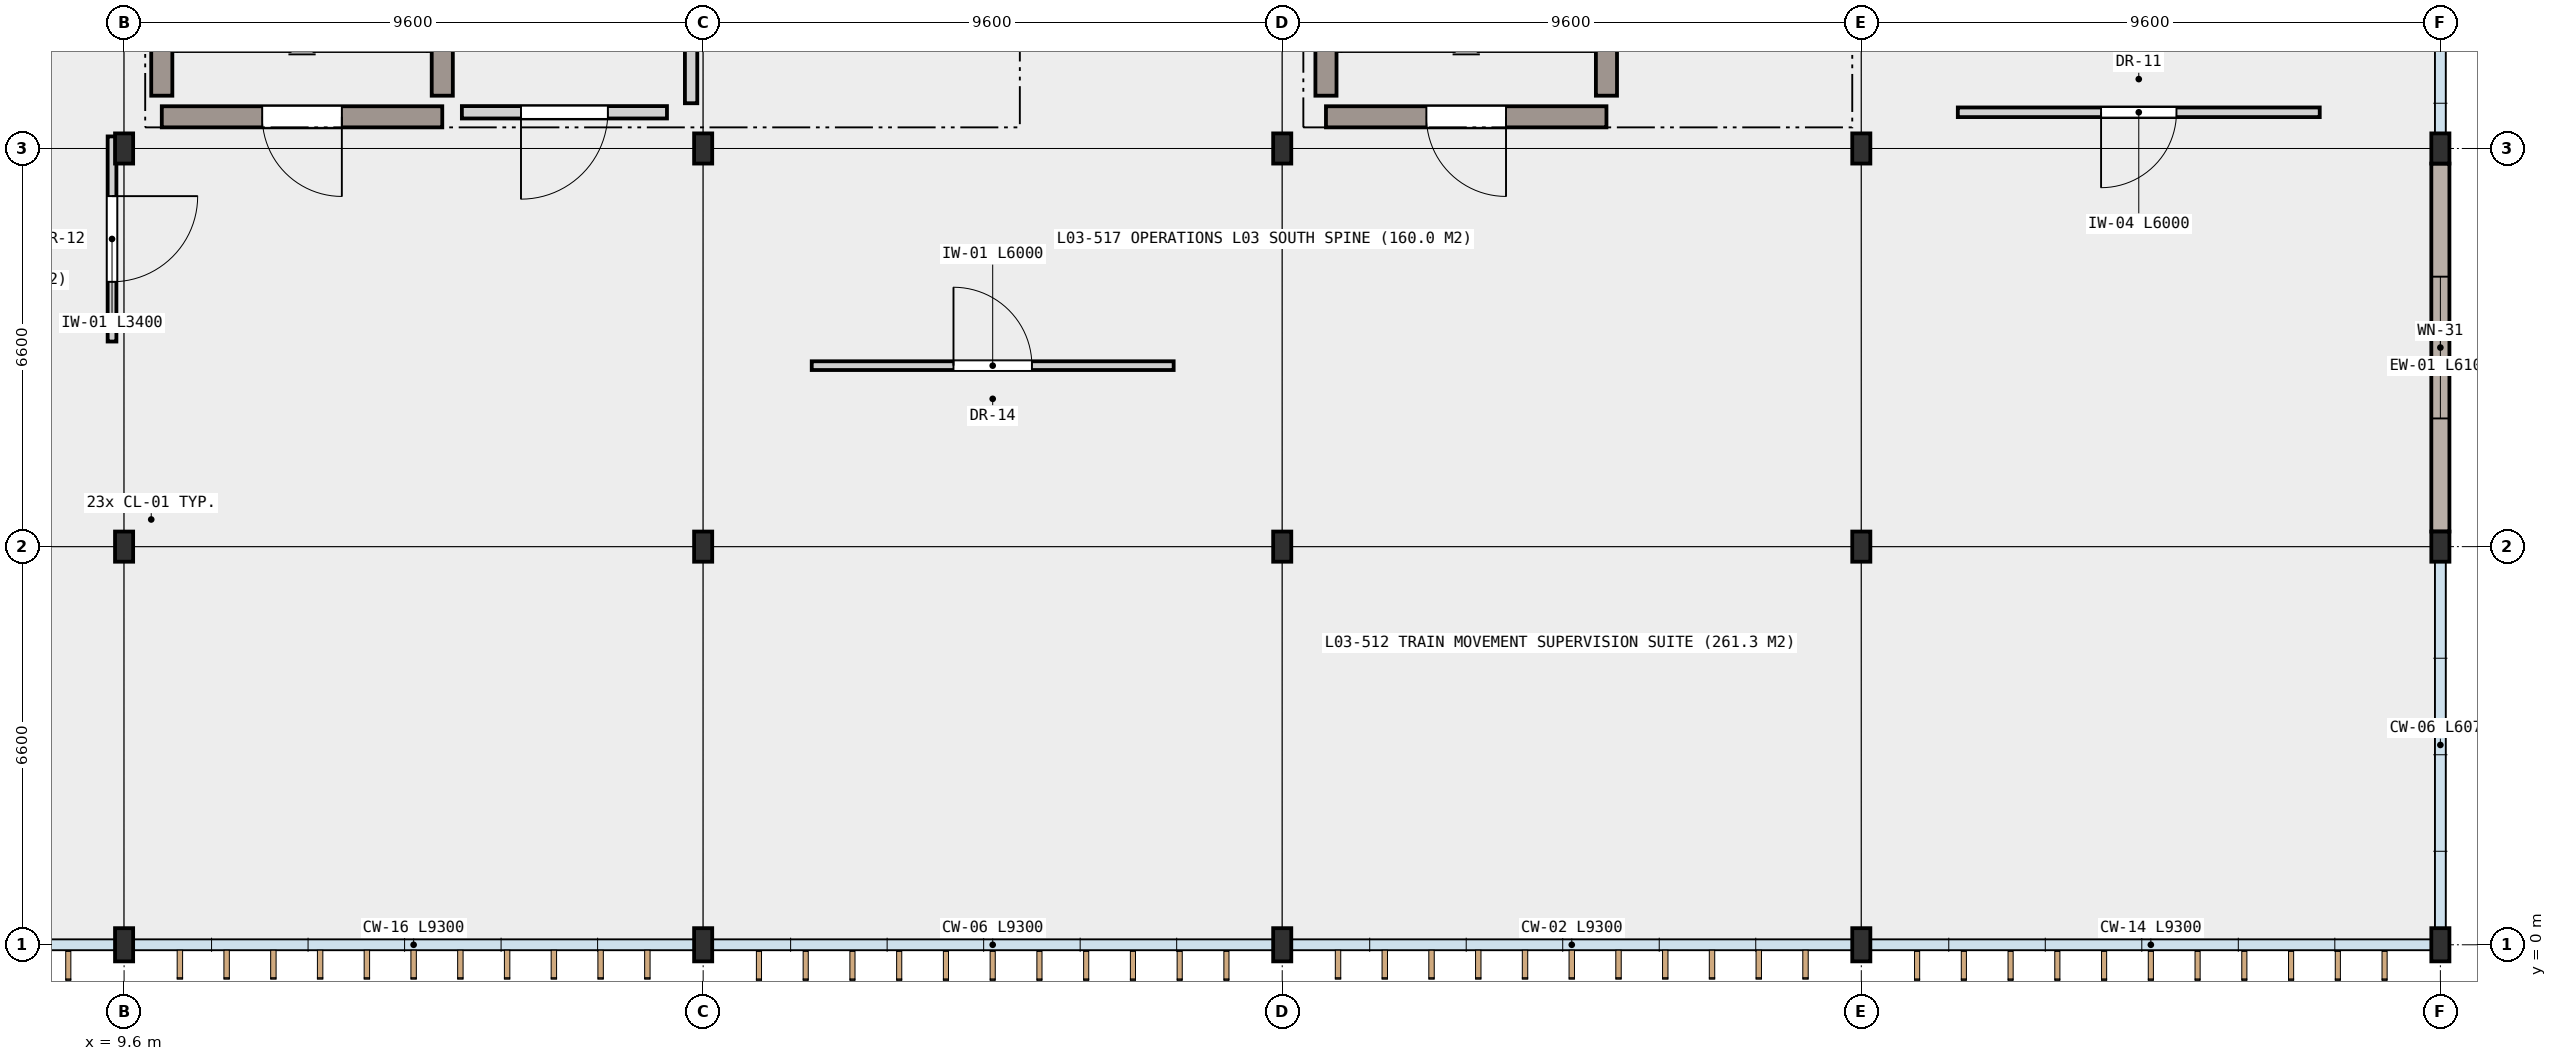
"""IFC4 building model, lengths in metres.
Left out: names, types, materials, properties, quantities, classifications, styles, units other than length and angle.
Written with IfcOpenShell. Run it as: python <this file> out.ifc"""

import sys

from ifc_helpers import new_model, si_unit, direction, frame, frame_2d, origin, origin_2d, place, context, subcontext, project, spatial, rectangle, i_section, extrude, element, fill, save


model = new_model("IFC4")
c1 = context("Model", 3, precision=1e-05, world=origin(), true_north=direction((0.0, 1.0)))
c2 = subcontext(c1, "Body", "Model", "MODEL_VIEW")
j1 = project(units=[si_unit("LENGTHUNIT", "METRE"), si_unit("PLANEANGLEUNIT", "RADIAN")], contexts=[c1])
p1 = place(None, origin())
s1 = spatial("IfcSite", under=j1, at=p1, CompositionType="ELEMENT")
p2 = place(p1, origin())
s2 = spatial("IfcBuilding", under=s1, at=p2, CompositionType="ELEMENT")
p3 = place(p2, frame((0.0, 0.0, 14.4)))
s3 = spatial("IfcBuildingStorey", under=s2, at=p3, CompositionType="ELEMENT", Elevation=14.4)
p4 = place(p3, frame((9.6, 0.0, 0.0), z_axis=(0.0, 0.0, 1.0), x_axis=(1.0, 0.0, 0.0)))
e1 = element("IfcColumn", 1, at=p4, inside=s3, PredefinedType="COLUMN", context=c2, shape_type="SweptSolid", body=[
    extrude(i_section(OverallWidth=0.3, OverallDepth=0.55, WebThickness=0.015, FlangeThickness=0.029, FilletRadius=0.027, at=origin_2d()), origin(), (0.0, 0.0, 1.0), 4.2),
])
for number, where, z_axis, x_axis in (
    (2, (9.6, 6.6, 0.0), (0.0, 0.0, 1.0), (1.0, 0.0, 0.0)),
    (3, (9.6, 13.2, 0.0), (0.0, 0.0, 1.0), (1.0, 0.0, 0.0)),
):
    element("IfcColumn", number, at=place(p3, frame(where, z_axis=z_axis, x_axis=x_axis)), inside=s3, PredefinedType="COLUMN", context=c2, shape_type="SweptSolid", body=[
        extrude(i_section(OverallWidth=0.3, OverallDepth=0.5, WebThickness=0.014, FlangeThickness=0.028, FilletRadius=0.027, at=origin_2d()), origin(), (0.0, 0.0, 1.0), 4.2),
    ])
p5 = place(p3, frame((19.2, 0.0, 0.0), z_axis=(0.0, 0.0, 1.0), x_axis=(1.0, 0.0, 0.0)))
e4 = element("IfcColumn", 4, at=p5, inside=s3, PredefinedType="COLUMN", context=c2, shape_type="SweptSolid", body=[
    extrude(i_section(OverallWidth=0.3, OverallDepth=0.55, WebThickness=0.015, FlangeThickness=0.029, FilletRadius=0.027, at=origin_2d()), origin(), (0.0, 0.0, 1.0), 4.2),
])
for number, where, z_axis, x_axis in (
    (5, (19.2, 6.6, 0.0), (0.0, 0.0, 1.0), (1.0, 0.0, 0.0)),
    (6, (19.2, 13.2, 0.0), (0.0, 0.0, 1.0), (1.0, 0.0, 0.0)),
):
    element("IfcColumn", number, at=place(p3, frame(where, z_axis=z_axis, x_axis=x_axis)), inside=s3, PredefinedType="COLUMN", context=c2, shape_type="SweptSolid", body=[
        extrude(i_section(OverallWidth=0.3, OverallDepth=0.5, WebThickness=0.014, FlangeThickness=0.028, FilletRadius=0.027, at=origin_2d()), origin(), (0.0, 0.0, 1.0), 4.2),
    ])
p6 = place(p3, frame((28.8, 0.0, 0.0), z_axis=(0.0, 0.0, 1.0), x_axis=(1.0, 0.0, 0.0)))
e7 = element("IfcColumn", 7, at=p6, inside=s3, PredefinedType="COLUMN", context=c2, shape_type="SweptSolid", body=[
    extrude(i_section(OverallWidth=0.3, OverallDepth=0.55, WebThickness=0.015, FlangeThickness=0.029, FilletRadius=0.027, at=origin_2d()), origin(), (0.0, 0.0, 1.0), 4.2),
])
for number, where, z_axis, x_axis in (
    (8, (28.8, 6.6, 0.0), (0.0, 0.0, 1.0), (1.0, 0.0, 0.0)),
    (9, (28.8, 13.2, 0.0), (0.0, 0.0, 1.0), (1.0, 0.0, 0.0)),
):
    element("IfcColumn", number, at=place(p3, frame(where, z_axis=z_axis, x_axis=x_axis)), inside=s3, PredefinedType="COLUMN", context=c2, shape_type="SweptSolid", body=[
        extrude(i_section(OverallWidth=0.3, OverallDepth=0.5, WebThickness=0.014, FlangeThickness=0.028, FilletRadius=0.027, at=origin_2d()), origin(), (0.0, 0.0, 1.0), 4.2),
    ])
p7 = place(p3, frame((38.4, 0.0, 0.0), z_axis=(0.0, 0.0, 1.0), x_axis=(1.0, 0.0, 0.0)))
e10 = element("IfcColumn", 10, at=p7, inside=s3, PredefinedType="COLUMN", context=c2, shape_type="SweptSolid", body=[
    extrude(i_section(OverallWidth=0.3, OverallDepth=0.55, WebThickness=0.015, FlangeThickness=0.029, FilletRadius=0.027, at=origin_2d()), origin(), (0.0, 0.0, 1.0), 4.2),
])
for number, where, z_axis, x_axis in (
    (11, (38.4, 6.6, 0.0), (0.0, 0.0, 1.0), (1.0, 0.0, 0.0)),
    (12, (38.4, 13.2, 0.0), (0.0, 0.0, 1.0), (1.0, 0.0, 0.0)),
):
    element("IfcColumn", number, at=place(p3, frame(where, z_axis=z_axis, x_axis=x_axis)), inside=s3, PredefinedType="COLUMN", context=c2, shape_type="SweptSolid", body=[
        extrude(i_section(OverallWidth=0.3, OverallDepth=0.5, WebThickness=0.014, FlangeThickness=0.028, FilletRadius=0.027, at=origin_2d()), origin(), (0.0, 0.0, 1.0), 4.2),
    ])
p8 = place(p3, frame((48.0, 0.0, 0.0), z_axis=(0.0, 0.0, 1.0), x_axis=(1.0, 0.0, 0.0)))
e13 = element("IfcColumn", 13, at=p8, inside=s3, PredefinedType="COLUMN", context=c2, shape_type="SweptSolid", body=[
    extrude(i_section(OverallWidth=0.3, OverallDepth=0.55, WebThickness=0.015, FlangeThickness=0.029, FilletRadius=0.027, at=origin_2d()), origin(), (0.0, 0.0, 1.0), 4.2),
])
for number, where, z_axis, x_axis in (
    (14, (48.0, 6.6, 0.0), (0.0, 0.0, 1.0), (1.0, 0.0, 0.0)),
    (15, (48.0, 13.2, 0.0), (0.0, 0.0, 1.0), (1.0, 0.0, 0.0)),
):
    element("IfcColumn", number, at=place(p3, frame(where, z_axis=z_axis, x_axis=x_axis)), inside=s3, PredefinedType="COLUMN", context=c2, shape_type="SweptSolid", body=[
        extrude(i_section(OverallWidth=0.3, OverallDepth=0.5, WebThickness=0.014, FlangeThickness=0.028, FilletRadius=0.027, at=origin_2d()), origin(), (0.0, 0.0, 1.0), 4.2),
    ])
p9 = place(p3, frame((48.0, 12.95, 0.0), z_axis=(0.0, 0.0, 1.0), x_axis=(0.0, -1.0, 0.0)))
e16 = element("IfcWall", 16, at=p9, inside=s3, PredefinedType="SOLIDWALL", context=c2, shape_type="SweptSolid", body=[
    extrude(rectangle(XDim=6.1, YDim=0.3, at=frame_2d((3.05, 0.0))), origin(), (0.0, 0.0, 1.0), 3.43),
])
p10 = place(p9, frame((1.875, 0.0, 0.85)))
e17 = element("IfcOpeningElement", 17, at=p10, cuts=e16, PredefinedType="OPENING", context=c2, shape_type="SweptSolid", body=[
    extrude(rectangle(XDim=2.35, YDim=1.85, at=frame_2d((1.175, 0.925))), frame((0.0, 0.16, 0.0), z_axis=(0.0, -1.0, 0.0), x_axis=(1.0, 0.0, 0.0)), (0.0, 0.0, 1.0), 0.32),
])
p11 = place(p3, frame((14.875, 13.725, 0.0), z_axis=(0.0, 0.0, 1.0), x_axis=(-1.0, 0.0, 0.0)))
e18 = element("IfcWall", 18, at=p11, inside=s3, PredefinedType="SHEAR", context=c2, shape_type="SweptSolid", body=[
    extrude(rectangle(XDim=4.65, YDim=0.35, at=frame_2d((2.325, 0.0))), origin(), (0.0, 0.0, 1.0), 3.96),
])
p12 = place(p11, frame((1.665, 0.0, 0.0)))
e19 = element("IfcOpeningElement", 19, at=p12, cuts=e18, PredefinedType="OPENING", context=c2, shape_type="SweptSolid", body=[
    extrude(rectangle(XDim=1.32, YDim=2.15, at=frame_2d((0.66, 1.075))), frame((0.0, 0.185, 0.0), z_axis=(0.0, -1.0, 0.0), x_axis=(1.0, 0.0, 0.0)), (0.0, 0.0, 1.0), 0.37),
])
for number, where, z_axis, x_axis in (
    (20, (10.225, 14.075, 0.0), (0.0, 0.0, 1.0), (0.0, 1.0, 0.0)),
    (21, (14.875, 21.125, 0.0), (0.0, 0.0, 1.0), (0.0, -1.0, 0.0)),
):
    element("IfcWall", number, at=place(p3, frame(where, z_axis=z_axis, x_axis=x_axis)), inside=s3, PredefinedType="SHEAR", context=c2, shape_type="SweptSolid", body=[
        extrude(rectangle(XDim=7.05, YDim=0.35, at=frame_2d((3.525, 0.0))), origin(), (0.0, 0.0, 1.0), 3.96),
    ])
p13 = place(p3, frame((34.175, 13.725, 0.0), z_axis=(0.0, 0.0, 1.0), x_axis=(-1.0, 0.0, 0.0)))
e22 = element("IfcWall", 22, at=p13, inside=s3, PredefinedType="SHEAR", context=c2, shape_type="SweptSolid", body=[
    extrude(rectangle(XDim=4.65, YDim=0.35, at=frame_2d((2.325, 0.0))), origin(), (0.0, 0.0, 1.0), 3.96),
])
p14 = place(p13, frame((1.665, 0.0, 0.0)))
e23 = element("IfcOpeningElement", 23, at=p14, cuts=e22, PredefinedType="OPENING", context=c2, shape_type="SweptSolid", body=[
    extrude(rectangle(XDim=1.32, YDim=2.15, at=frame_2d((0.66, 1.075))), frame((0.0, 0.185, 0.0), z_axis=(0.0, -1.0, 0.0), x_axis=(1.0, 0.0, 0.0)), (0.0, 0.0, 1.0), 0.37),
])
for number, where, z_axis, x_axis in (
    (24, (29.525, 14.075, 0.0), (0.0, 0.0, 1.0), (0.0, 1.0, 0.0)),
    (25, (34.175, 21.125, 0.0), (0.0, 0.0, 1.0), (0.0, -1.0, 0.0)),
):
    element("IfcWall", number, at=place(p3, frame(where, z_axis=z_axis, x_axis=x_axis)), inside=s3, PredefinedType="SHEAR", context=c2, shape_type="SweptSolid", body=[
        extrude(rectangle(XDim=7.05, YDim=0.35, at=frame_2d((3.525, 0.0))), origin(), (0.0, 0.0, 1.0), 3.96),
    ])
p15 = place(p3, frame((18.6, 13.8, 0.0), z_axis=(0.0, 0.0, 1.0), x_axis=(-1.0, 0.0, 0.0)))
e26 = element("IfcWall", 26, at=p15, inside=s3, PredefinedType="PARTITIONING", context=c2, shape_type="SweptSolid", body=[
    extrude(rectangle(XDim=3.4, YDim=0.205, at=frame_2d((1.7, 0.0))), origin(), (0.0, 0.0, 1.0), 3.96),
])
p16 = place(p15, frame((0.98, 0.0, 0.0)))
e27 = element("IfcOpeningElement", 27, at=p16, cuts=e26, PredefinedType="OPENING", context=c2, shape_type="SweptSolid", body=[
    extrude(rectangle(XDim=1.44, YDim=2.18, at=frame_2d((0.72, 1.09))), frame((0.0, 0.113, 0.0), z_axis=(0.0, -1.0, 0.0), x_axis=(1.0, 0.0, 0.0)), (0.0, 0.0, 1.0), 0.225),
])
p17 = place(p3, frame((19.0, 18.45, 0.0), z_axis=(0.0, 0.0, 1.0), x_axis=(0.0, -1.0, 0.0)))
e28 = element("IfcWall", 28, at=p17, inside=s3, PredefinedType="PARTITIONING", context=c2, shape_type="SweptSolid", body=[
    extrude(rectangle(XDim=4.5, YDim=0.205, at=frame_2d((2.25, 0.0))), origin(), (0.0, 0.0, 1.0), 3.38),
])
p18 = place(p3, frame((46.0, 13.8, 0.0), z_axis=(0.0, 0.0, 1.0), x_axis=(-1.0, 0.0, 0.0)))
e29 = element("IfcWall", 29, at=p18, inside=s3, PredefinedType="PARTITIONING", context=c2, shape_type="SweptSolid", body=[
    extrude(rectangle(XDim=6.0, YDim=0.16, at=frame_2d((3.0, 0.0))), origin(), (0.0, 0.0, 1.0), 3.96),
])
p19 = place(p18, frame((2.375, 0.0, 0.0)))
e30 = element("IfcOpeningElement", 30, at=p19, cuts=e29, PredefinedType="OPENING", context=c2, shape_type="SweptSolid", body=[
    extrude(rectangle(XDim=1.25, YDim=2.16, at=frame_2d((0.625, 1.08))), frame((0.0, 0.09, 0.0), z_axis=(0.0, -1.0, 0.0), x_axis=(1.0, 0.0, 0.0)), (0.0, 0.0, 1.0), 0.18),
])
p20 = place(p3, frame((21.0, 9.6, 0.0), z_axis=(0.0, 0.0, 1.0), x_axis=(1.0, 0.0, 0.0)))
e31 = element("IfcWall", 31, at=p20, inside=s3, PredefinedType="PARTITIONING", context=c2, shape_type="SweptSolid", body=[
    extrude(rectangle(XDim=6.0, YDim=0.145, at=frame_2d((3.0, 0.0))), origin(), (0.0, 0.0, 1.0), 3.96),
])
p21 = place(p20, frame((2.35, 0.0, 0.0)))
e32 = element("IfcOpeningElement", 32, at=p21, cuts=e31, PredefinedType="OPENING", context=c2, shape_type="SweptSolid", body=[
    extrude(rectangle(XDim=1.3, YDim=2.16, at=frame_2d((0.65, 1.08))), frame((0.0, 0.083, 0.0), z_axis=(0.0, -1.0, 0.0), x_axis=(1.0, 0.0, 0.0)), (0.0, 0.0, 1.0), 0.165),
])
p22 = place(p3, frame((9.4, 13.4, 0.0), z_axis=(0.0, 0.0, 1.0), x_axis=(0.0, -1.0, 0.0)))
e33 = element("IfcWall", 33, at=p22, inside=s3, PredefinedType="PARTITIONING", context=c2, shape_type="SweptSolid", body=[
    extrude(rectangle(XDim=3.4, YDim=0.145, at=frame_2d((1.7, 0.0))), origin(), (0.0, 0.0, 1.0), 3.43),
])
p23 = place(p22, frame((0.99, 0.0, 0.0)))
e34 = element("IfcOpeningElement", 34, at=p23, cuts=e33, PredefinedType="OPENING", context=c2, shape_type="SweptSolid", body=[
    extrude(rectangle(XDim=1.42, YDim=2.18, at=frame_2d((0.71, 1.09))), frame((0.0, 0.083, 0.0), z_axis=(0.0, -1.0, 0.0), x_axis=(1.0, 0.0, 0.0)), (0.0, 0.0, 1.0), 0.165),
])
p24 = place(p10, origin())
e35 = element("IfcWindow", 35, at=p24, inside=s3, PartitioningType="SINGLE_PANEL", PredefinedType="WINDOW", context=c2, shape_type="SweptSolid", body=[
    extrude(rectangle(XDim=2.35, YDim=1.85, at=frame_2d((1.175, 0.925))), frame((0.0, 0.03, 0.0), z_axis=(0.0, -1.0, 0.0), x_axis=(1.0, 0.0, 0.0)), (0.0, 0.0, 1.0), 0.06),
])
fill(e17, e35)
p25 = place(p12, origin())
e36 = element("IfcDoor", 36, at=p25, inside=s3, OperationType="SINGLE_SWING_LEFT", PredefinedType="DOOR", context=c2, shape_type="SweptSolid", body=[
    extrude(rectangle(XDim=1.32, YDim=2.15, at=frame_2d((0.66, 1.075))), frame((0.0, 0.025, 0.0), z_axis=(0.0, -1.0, 0.0), x_axis=(1.0, 0.0, 0.0)), (0.0, 0.0, 1.0), 0.05),
])
fill(e19, e36)
p26 = place(p14, origin())
e37 = element("IfcDoor", 37, at=p26, inside=s3, OperationType="SINGLE_SWING_LEFT", PredefinedType="DOOR", context=c2, shape_type="SweptSolid", body=[
    extrude(rectangle(XDim=1.32, YDim=2.15, at=frame_2d((0.66, 1.075))), frame((0.0, 0.025, 0.0), z_axis=(0.0, -1.0, 0.0), x_axis=(1.0, 0.0, 0.0)), (0.0, 0.0, 1.0), 0.05),
])
fill(e23, e37)
p27 = place(p16, origin())
e38 = element("IfcDoor", 38, at=p27, inside=s3, OperationType="SINGLE_SWING_RIGHT", PredefinedType="DOOR", context=c2, shape_type="SweptSolid", body=[
    extrude(rectangle(XDim=1.44, YDim=2.18, at=frame_2d((0.72, 1.09))), frame((0.0, 0.025, 0.0), z_axis=(0.0, -1.0, 0.0), x_axis=(1.0, 0.0, 0.0)), (0.0, 0.0, 1.0), 0.05),
])
fill(e27, e38)
p28 = place(p19, origin())
e39 = element("IfcDoor", 39, at=p28, inside=s3, OperationType="SINGLE_SWING_RIGHT", PredefinedType="DOOR", context=c2, shape_type="SweptSolid", body=[
    extrude(rectangle(XDim=1.25, YDim=2.16, at=frame_2d((0.625, 1.08))), frame((0.0, 0.025, 0.0), z_axis=(0.0, -1.0, 0.0), x_axis=(1.0, 0.0, 0.0)), (0.0, 0.0, 1.0), 0.05),
])
fill(e30, e39)
p29 = place(p21, origin())
e40 = element("IfcDoor", 40, at=p29, inside=s3, OperationType="SINGLE_SWING_LEFT", PredefinedType="DOOR", context=c2, shape_type="SweptSolid", body=[
    extrude(rectangle(XDim=1.3, YDim=2.16, at=frame_2d((0.65, 1.08))), frame((0.0, 0.025, 0.0), z_axis=(0.0, -1.0, 0.0), x_axis=(1.0, 0.0, 0.0)), (0.0, 0.0, 1.0), 0.05),
])
fill(e32, e40)
p30 = place(p23, origin())
e41 = element("IfcDoor", 41, at=p30, inside=s3, OperationType="SINGLE_SWING_LEFT", PredefinedType="DOOR", context=c2, shape_type="SweptSolid", body=[
    extrude(rectangle(XDim=1.42, YDim=2.18, at=frame_2d((0.71, 1.09))), frame((0.0, 0.025, 0.0), z_axis=(0.0, -1.0, 0.0), x_axis=(1.0, 0.0, 0.0)), (0.0, 0.0, 1.0), 0.05),
])
fill(e34, e41)
save(model, sys.argv[1])
